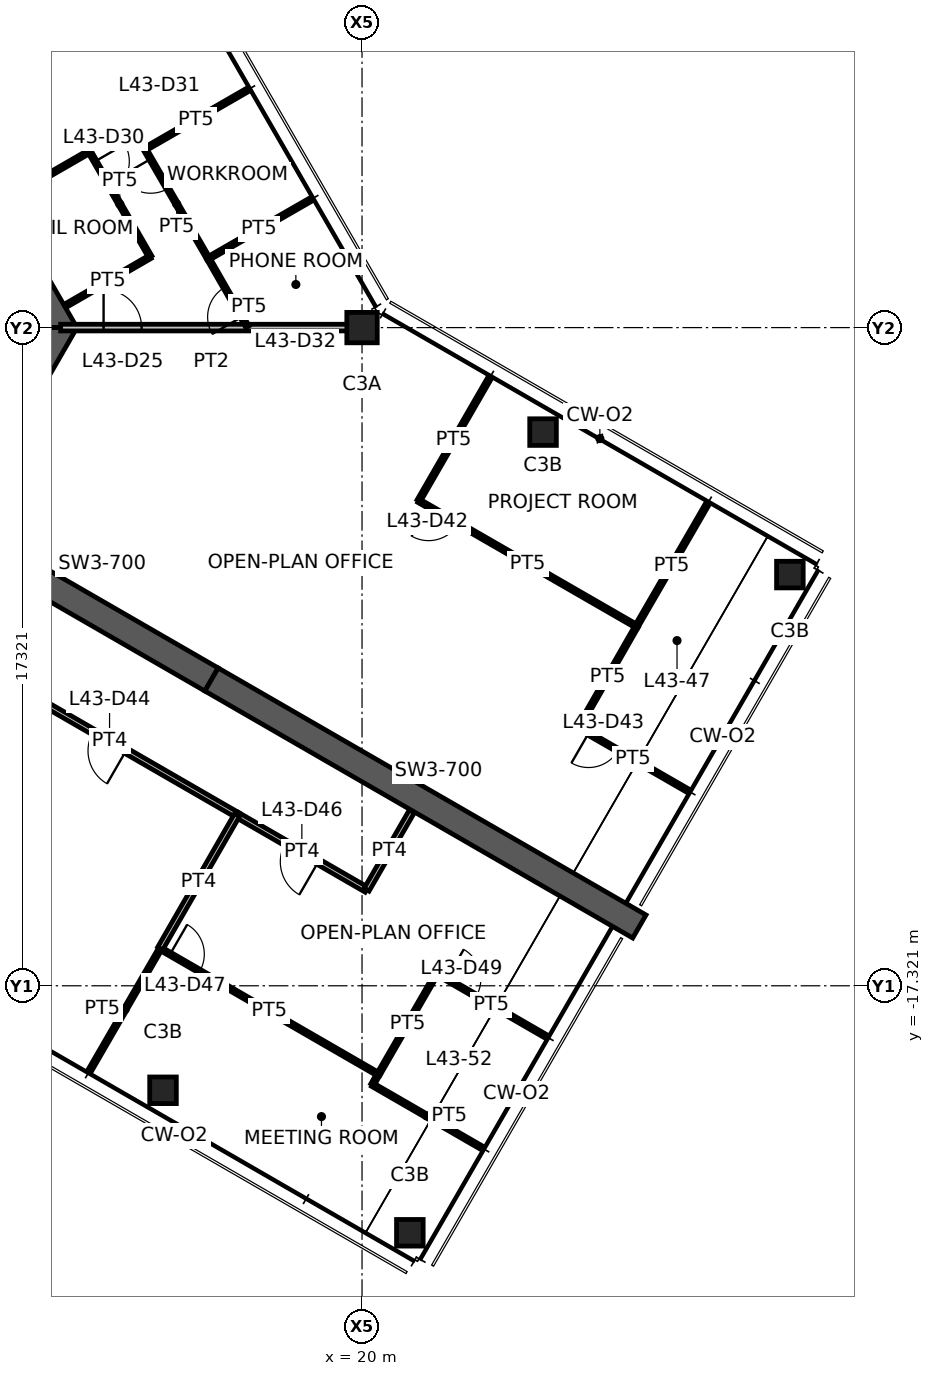
"""IFC4 building model, lengths in metres.
Left out: names, types, materials, properties, quantities, classifications, styles, units other than length and angle.
Written with IfcOpenShell. Run it as: python <this file> out.ifc"""

import sys

from ifc_helpers import new_model, si_unit, direction, frame, frame_2d, origin, origin_2d, place, context, subcontext, project, spatial, polyline, rectangle, hollow_rectangle, outline, extrude, element, fill, save


model = new_model("IFC4")
c1 = context("Model", 3, precision=1e-05, world=origin(), true_north=direction((0.0, 1.0)))
c2 = subcontext(c1, "Body", "Model", "MODEL_VIEW")
j1 = project(units=[si_unit("LENGTHUNIT", "METRE"), si_unit("PLANEANGLEUNIT", "RADIAN")], contexts=[c1])
p1 = place(None, origin())
s1 = spatial("IfcSite", under=j1, at=p1, CompositionType="ELEMENT")
p2 = place(p1, origin())
s2 = spatial("IfcBuilding", under=s1, at=p2, CompositionType="ELEMENT")
p3 = place(p2, frame((0.0, 0.0, 172.1)))
s3 = spatial("IfcBuildingStorey", under=s2, at=p3, CompositionType="ELEMENT", Elevation=172.1)
p4 = place(p3, frame((20.0, 0.0, 0.0), z_axis=(0.0, 0.0, 1.0), x_axis=(1.0, 0.0, 0.0)))
e1 = element("IfcColumn", 1, at=p4, inside=s3, PredefinedType="COLUMN", context=c2, shape_type="SweptSolid", body=[
    extrude(hollow_rectangle(XDim=0.8, YDim=0.8, WallThickness=0.045, at=origin_2d()), origin(), (0.0, 0.0, 1.0), 3.9),
])
for number, where, z_axis, x_axis in (
    (2, (14.763, -20.071, 0.0), (0.0, 0.0, 1.0), (1.0, 0.0, 0.0)),
    (3, (21.258, -23.821, 0.0), (0.0, 0.0, 1.0), (1.0, 0.0, 0.0)),
    (4, (24.763, -2.75, 0.0), (0.0, 0.0, 1.0), (1.0, 0.0, 0.0)),
    (5, (31.258, -6.5, 0.0), (0.0, 0.0, 1.0), (1.0, 0.0, 0.0)),
):
    element("IfcColumn", number, at=place(p3, frame(where, z_axis=z_axis, x_axis=x_axis)), inside=s3, PredefinedType="COLUMN", context=c2, shape_type="SweptSolid", body=[
        extrude(hollow_rectangle(XDim=0.7, YDim=0.7, WallThickness=0.036, at=origin_2d()), origin(), (0.0, 0.0, 1.0), 3.9),
    ])
p5 = place(p3, frame((11.922, 0.0, 0.0), z_axis=(0.0, 0.0, 1.0), x_axis=(-0.500004296715, 0.866022923061, 0.0)))
e6 = element("IfcWall", 6, at=p5, inside=s3, PredefinedType="SHEAR", context=c2, shape_type="SweptSolid", body=[
    extrude(outline(polyline([(-0.289, -0.5), (5.835, -0.5), (6.635, -0.5), (12.211, -0.5), (11.634, 0.5), (6.635, 0.5), (5.835, 0.5), (0.289, 0.5), (-0.289, -0.5)])), origin(), (0.0, 0.0, 1.0), 3.9),
])
p6 = place(p5, frame((5.835, 0.0, 0.0)))
e7 = element("IfcOpeningElement", 7, at=p6, cuts=e6, PredefinedType="OPENING", context=c2, shape_type="SweptSolid", body=[
    extrude(rectangle(XDim=0.8, YDim=2.1, at=frame_2d((0.4, 1.05))), frame((0.0, 0.51, 0.0), z_axis=(0.0, -1.0, 0.0), x_axis=(1.0, 0.0, 0.0)), (0.0, 0.0, 1.0), 1.02),
])
p7 = place(p3, frame((5.961, -10.325, 0.0), z_axis=(0.0, 0.0, 1.0), x_axis=(0.500004296715, 0.866022923061, 0.0)))
e8 = element("IfcWall", 8, at=p7, inside=s3, PredefinedType="SHEAR", context=c2, shape_type="SweptSolid", body=[
    extrude(outline(polyline([(-0.289, -0.5), (4.594, -0.5), (5.394, -0.5), (12.211, -0.5), (11.634, 0.5), (5.394, 0.5), (4.594, 0.5), (0.289, 0.5), (-0.289, -0.5)])), origin(), (0.0, 0.0, 1.0), 3.9),
])
p8 = place(p7, frame((4.594, 0.0, 0.0)))
e9 = element("IfcOpeningElement", 9, at=p8, cuts=e8, PredefinedType="OPENING", context=c2, shape_type="SweptSolid", body=[
    extrude(rectangle(XDim=0.8, YDim=2.1, at=frame_2d((0.4, 1.05))), frame((0.0, 0.51, 0.0), z_axis=(0.0, -1.0, 0.0), x_axis=(1.0, 0.0, 0.0)), (0.0, 0.0, 1.0), 1.02),
])
p9 = place(p3, frame((9.375, -5.413, 0.0), z_axis=(0.0, 0.0, 1.0), x_axis=(0.866032377459, -0.499987921047, 0.0)))
e10 = element("IfcWall", 10, at=p9, inside=s3, PredefinedType="SHEAR", context=c2, shape_type="SweptSolid", body=[
    extrude(rectangle(XDim=7.696, YDim=0.7, at=frame_2d((3.848, 0.0))), origin(), (0.0, 0.0, 1.0), 3.9),
])
p10 = place(p9, frame((0.9, 0.0, 0.0)))
e11 = element("IfcOpeningElement", 11, at=p10, cuts=e10, PredefinedType="OPENING", context=c2, shape_type="SweptSolid", body=[
    extrude(rectangle(XDim=1.0, YDim=2.1, at=frame_2d((0.5, 1.05))), frame((0.0, 0.36, 0.0), z_axis=(0.0, -1.0, 0.0), x_axis=(1.0, 0.0, 0.0)), (0.0, 0.0, 1.0), 0.72),
])
p11 = place(p3, frame((16.039, -9.26, 0.0), z_axis=(0.0, 0.0, 1.0), x_axis=(0.866024837091, -0.50000098154, 0.0)))
e12 = element("IfcWall", 12, at=p11, inside=s3, PredefinedType="SHEAR", context=c2, shape_type="SweptSolid", body=[
    extrude(rectangle(XDim=13.0, YDim=0.7, at=frame_2d((6.5, 0.0))), origin(), (0.0, 0.0, 1.0), 3.9),
])
p12 = place(p3, frame((12.07, 0.0, 0.0), z_axis=(0.0, 0.0, 1.0), x_axis=(1.0, 0.0, 0.0)))
e13 = element("IfcWall", 13, at=p12, inside=s3, PredefinedType="PARTITIONING", context=c2, shape_type="SweptSolid", body=[
    extrude(rectangle(XDim=7.93, YDim=0.175, at=frame_2d((3.965, 0.0))), origin(), (0.0, 0.0, 1.0), 3.05),
])
p13 = place(p12, frame((1.13, 0.0, 0.0)))
e14 = element("IfcOpeningElement", 14, at=p13, cuts=e13, PredefinedType="OPENING", context=c2, shape_type="SweptSolid", body=[
    extrude(rectangle(XDim=1.0, YDim=2.1, at=frame_2d((0.5, 1.05))), frame((0.0, 0.098, 0.0), z_axis=(0.0, -1.0, 0.0), x_axis=(1.0, 0.0, 0.0)), (0.0, 0.0, 1.0), 0.195),
])
p14 = place(p3, frame((10.592, 3.344, 0.0), z_axis=(0.0, 0.0, 1.0), x_axis=(0.866021702275, 0.500006411147, 0.0)))
e15 = element("IfcWall", 15, at=p14, inside=s3, PredefinedType="PARTITIONING", context=c2, shape_type="SweptSolid", body=[
    extrude(rectangle(XDim=2.58, YDim=0.1, at=frame_2d((1.29, 0.0))), origin(), (0.0, 0.0, 1.0), 2.95),
])
p15 = place(p3, frame((12.826, 4.634, 0.0), z_axis=(0.0, 0.0, 1.0), x_axis=(0.500028443584, -0.866008981251, 0.0)))
e16 = element("IfcWall", 16, at=p15, inside=s3, PredefinedType="PARTITIONING", context=c2, shape_type="SweptSolid", body=[
    extrude(rectangle(XDim=3.2, YDim=0.1, at=frame_2d((1.6, 0.0))), origin(), (0.0, 0.0, 1.0), 2.95),
])
p16 = place(p15, frame((0.3, 0.0, 0.0)))
e17 = element("IfcOpeningElement", 17, at=p16, cuts=e16, PredefinedType="OPENING", context=c2, shape_type="SweptSolid", body=[
    extrude(rectangle(XDim=0.9, YDim=2.1, at=frame_2d((0.45, 1.05))), frame((0.0, 0.06, 0.0), z_axis=(0.0, -1.0, 0.0), x_axis=(1.0, 0.0, 0.0)), (0.0, 0.0, 1.0), 0.12),
])
p17 = place(p3, frame((14.427, 1.863, 0.0), z_axis=(0.0, 0.0, 1.0), x_axis=(-0.866045356598, -0.49996543912, 0.0)))
e18 = element("IfcWall", 18, at=p17, inside=s3, PredefinedType="PARTITIONING", context=c2, shape_type="SweptSolid", body=[
    extrude(rectangle(XDim=2.58, YDim=0.1, at=frame_2d((1.29, 0.0))), origin(), (0.0, 0.0, 1.0), 2.95),
])
p18 = place(p3, frame((18.62, 3.351, 0.0), z_axis=(0.0, 0.0, 1.0), x_axis=(-0.866810383216, -0.498637904244, 0.0)))
e19 = element("IfcWall", 19, at=p18, inside=s3, PredefinedType="PARTITIONING", context=c2, shape_type="SweptSolid", body=[
    extrude(rectangle(XDim=3.08, YDim=0.1, at=frame_2d((1.54, 0.0))), origin(), (0.0, 0.0, 1.0), 2.95),
])
p19 = place(p3, frame((14.287, 4.695, 0.0), z_axis=(0.0, 0.0, 1.0), x_axis=(0.866023220135, 0.500003782172, 0.0)))
e20 = element("IfcWall", 20, at=p19, inside=s3, PredefinedType="PARTITIONING", context=c2, shape_type="SweptSolid", body=[
    extrude(rectangle(XDim=3.105, YDim=0.1, at=frame_2d((1.552, 0.0))), origin(), (0.0, 0.0, 1.0), 2.95),
])
p20 = place(p3, frame((15.956, 1.813, 0.0), z_axis=(0.0, 0.0, 1.0), x_axis=(-0.501111387448, 0.865382792393, 0.0)))
e21 = element("IfcWall", 21, at=p20, inside=s3, PredefinedType="PARTITIONING", context=c2, shape_type="SweptSolid", body=[
    extrude(rectangle(XDim=3.331, YDim=0.1, at=frame_2d((1.666, 0.0))), origin(), (0.0, 0.0, 1.0), 2.95),
])
p21 = place(p20, frame((2.131, 0.0, 0.0)))
e22 = element("IfcOpeningElement", 22, at=p21, cuts=e21, PredefinedType="OPENING", context=c2, shape_type="SweptSolid", body=[
    extrude(rectangle(XDim=0.9, YDim=2.1, at=frame_2d((0.45, 1.05))), frame((0.0, 0.06, 0.0), z_axis=(0.0, -1.0, 0.0), x_axis=(1.0, 0.0, 0.0)), (0.0, 0.0, 1.0), 0.12),
])
p22 = place(p3, frame((16.986, 0.02, 0.0), z_axis=(0.0, 0.0, 1.0), x_axis=(-0.498096123952, 0.867121820337, 0.0)))
e23 = element("IfcWall", 23, at=p22, inside=s3, PredefinedType="PARTITIONING", context=c2, shape_type="SweptSolid", body=[
    extrude(rectangle(XDim=2.067, YDim=0.1, at=frame_2d((1.034, 0.0))), origin(), (0.0, 0.0, 1.0), 2.95),
])
p23 = place(p22, frame((0.3, 0.0, 0.0)))
e24 = element("IfcOpeningElement", 24, at=p23, cuts=e23, PredefinedType="OPENING", context=c2, shape_type="SweptSolid", body=[
    extrude(rectangle(XDim=0.9, YDim=2.1, at=frame_2d((0.45, 1.05))), frame((0.0, 0.06, 0.0), z_axis=(0.0, -1.0, 0.0), x_axis=(1.0, 0.0, 0.0)), (0.0, 0.0, 1.0), 0.12),
])
p24 = place(p3, frame((29.077, -4.658, 0.0), z_axis=(0.0, 0.0, 1.0), x_axis=(-0.501275229052, -0.865287897026, 0.0)))
e25 = element("IfcWall", 25, at=p24, inside=s3, PredefinedType="PARTITIONING", context=c2, shape_type="SweptSolid", body=[
    extrude(rectangle(XDim=3.705, YDim=0.1, at=frame_2d((1.853, 0.0))), origin(), (0.0, 0.0, 1.0), 2.95),
])
p25 = place(p3, frame((21.492, -4.557, 0.0), z_axis=(0.0, 0.0, 1.0), x_axis=(0.500013413428, 0.866017659399, 0.0)))
e26 = element("IfcWall", 26, at=p25, inside=s3, PredefinedType="PARTITIONING", context=c2, shape_type="SweptSolid", body=[
    extrude(rectangle(XDim=3.68, YDim=0.1, at=frame_2d((1.84, 0.0))), origin(), (0.0, 0.0, 1.0), 2.95),
])
p26 = place(p3, frame((27.227, -7.863, 0.0), z_axis=(0.0, 0.0, 1.0), x_axis=(-0.866343956507, 0.499447844147, 0.0)))
e27 = element("IfcWall", 27, at=p26, inside=s3, PredefinedType="PARTITIONING", context=c2, shape_type="SweptSolid", body=[
    extrude(rectangle(XDim=6.62, YDim=0.1, at=frame_2d((3.31, 0.0))), origin(), (0.0, 0.0, 1.0), 2.95),
])
p27 = place(p26, frame((5.42, 0.0, 0.0)))
e28 = element("IfcOpeningElement", 28, at=p27, cuts=e27, PredefinedType="OPENING", context=c2, shape_type="SweptSolid", body=[
    extrude(rectangle(XDim=0.9, YDim=2.1, at=frame_2d((0.45, 1.05))), frame((0.0, 0.06, 0.0), z_axis=(0.0, -1.0, 0.0), x_axis=(1.0, 0.0, 0.0)), (0.0, 0.0, 1.0), 0.12),
])
p28 = place(p3, frame((25.7, -10.527, 0.0), z_axis=(0.0, 0.0, 1.0), x_axis=(0.497097650811, 0.867694603855, 0.0)))
e29 = element("IfcWall", 29, at=p28, inside=s3, PredefinedType="PARTITIONING", context=c2, shape_type="SweptSolid", body=[
    extrude(rectangle(XDim=3.071, YDim=0.1, at=frame_2d((1.535, 0.0))), origin(), (0.0, 0.0, 1.0), 2.95),
])
p29 = place(p3, frame((28.562, -12.18, 0.0), z_axis=(0.0, 0.0, 1.0), x_axis=(-0.866020751647, 0.500008057651, 0.0)))
e30 = element("IfcWall", 30, at=p29, inside=s3, PredefinedType="PARTITIONING", context=c2, shape_type="SweptSolid", body=[
    extrude(rectangle(XDim=3.305, YDim=0.1, at=frame_2d((1.653, 0.0))), origin(), (0.0, 0.0, 1.0), 2.95),
])
p30 = place(p29, frame((2.105, 0.0, 0.0)))
e31 = element("IfcOpeningElement", 31, at=p30, cuts=e30, PredefinedType="OPENING", context=c2, shape_type="SweptSolid", body=[
    extrude(rectangle(XDim=0.9, YDim=2.1, at=frame_2d((0.45, 1.05))), frame((0.0, 0.06, 0.0), z_axis=(0.0, -1.0, 0.0), x_axis=(1.0, 0.0, 0.0)), (0.0, 0.0, 1.0), 0.12),
])
p31 = place(p3, frame((16.721, -12.83, 0.0), z_axis=(0.0, 0.0, 1.0), x_axis=(-0.866020780657, 0.500008007406, 0.0)))
e32 = element("IfcWall", 32, at=p31, inside=s3, PredefinedType="PARTITIONING", context=c2, shape_type="SweptSolid", body=[
    extrude(rectangle(XDim=7.771, YDim=0.15, at=frame_2d((3.885, 0.0))), origin(), (0.0, 0.0, 1.0), 2.95),
])
p32 = place(p31, frame((3.385, 0.0, 0.0)))
e33 = element("IfcOpeningElement", 33, at=p32, cuts=e32, PredefinedType="OPENING", context=c2, shape_type="SweptSolid", body=[
    extrude(rectangle(XDim=1.0, YDim=2.1, at=frame_2d((0.5, 1.05))), frame((0.0, 0.085, 0.0), z_axis=(0.0, -1.0, 0.0), x_axis=(1.0, 0.0, 0.0)), (0.0, 0.0, 1.0), 0.17),
])
p33 = place(p3, frame((20.12, -14.792, 0.0), z_axis=(0.0, 0.0, 1.0), x_axis=(-0.866038848349, 0.499976712608, 0.0)))
e34 = element("IfcWall", 34, at=p33, inside=s3, PredefinedType="PARTITIONING", context=c2, shape_type="SweptSolid", body=[
    extrude(rectangle(XDim=3.934, YDim=0.15, at=frame_2d((1.967, 0.0))), origin(), (0.0, 0.0, 1.0), 2.95),
])
p34 = place(p33, frame((1.467, 0.0, 0.0)))
e35 = element("IfcOpeningElement", 35, at=p34, cuts=e34, PredefinedType="OPENING", context=c2, shape_type="SweptSolid", body=[
    extrude(rectangle(XDim=1.0, YDim=2.1, at=frame_2d((0.5, 1.05))), frame((0.0, 0.085, 0.0), z_axis=(0.0, -1.0, 0.0), x_axis=(1.0, 0.0, 0.0)), (0.0, 0.0, 1.0), 0.17),
])
p35 = place(p3, frame((21.31, -12.731, 0.0), z_axis=(0.0, 0.0, 1.0), x_axis=(-0.500077627542, -0.865980580863, 0.0)))
e36 = element("IfcWall", 36, at=p35, inside=s3, PredefinedType="PARTITIONING", context=c2, shape_type="SweptSolid", body=[
    extrude(rectangle(XDim=2.38, YDim=0.15, at=frame_2d((1.19, 0.0))), origin(), (0.0, 0.0, 1.0), 2.95),
])
p36 = place(p3, frame((20.275, -19.924, 0.0), z_axis=(0.0, 0.0, 1.0), x_axis=(0.86598972202, -0.500061797536, 0.0)))
e37 = element("IfcWall", 37, at=p36, inside=s3, PredefinedType="PARTITIONING", context=c2, shape_type="SweptSolid", body=[
    extrude(rectangle(XDim=3.28, YDim=0.1, at=frame_2d((1.64, 0.0))), origin(), (0.0, 0.0, 1.0), 2.95),
])
p37 = place(p3, frame((20.43, -19.646, 0.0), z_axis=(0.0, 0.0, 1.0), x_axis=(-0.486425680342, -0.873721956634, 0.0)))
e38 = element("IfcWall", 38, at=p37, inside=s3, PredefinedType="PARTITIONING", context=c2, shape_type="SweptSolid", body=[
    extrude(rectangle(XDim=0.318, YDim=0.1, at=frame_2d((0.159, 0.0))), origin(), (0.0, 0.0, 1.0), 2.95),
])
p38 = place(p3, frame((12.84, -19.543, 0.0), z_axis=(0.0, 0.0, 1.0), x_axis=(0.50111938689, 0.865378160161, 0.0)))
e39 = element("IfcWall", 39, at=p38, inside=s3, PredefinedType="PARTITIONING", context=c2, shape_type="SweptSolid", body=[
    extrude(rectangle(XDim=3.705, YDim=0.1, at=frame_2d((1.853, 0.0))), origin(), (0.0, 0.0, 1.0), 2.95),
])
p39 = place(p3, frame((14.69, -16.338, 0.0), z_axis=(0.0, 0.0, 1.0), x_axis=(0.866056800938, -0.499945614591, 0.0)))
e40 = element("IfcWall", 40, at=p39, inside=s3, PredefinedType="PARTITIONING", context=c2, shape_type="SweptSolid", body=[
    extrude(rectangle(XDim=6.629, YDim=0.1, at=frame_2d((3.314, 0.0))), origin(), (0.0, 0.0, 1.0), 2.95),
])
p40 = place(p39, frame((0.3, 0.0, 0.0)))
e41 = element("IfcOpeningElement", 41, at=p40, cuts=e40, PredefinedType="OPENING", context=c2, shape_type="SweptSolid", body=[
    extrude(rectangle(XDim=0.9, YDim=2.1, at=frame_2d((0.45, 1.05))), frame((0.0, 0.06, 0.0), z_axis=(0.0, -1.0, 0.0), x_axis=(1.0, 0.0, 0.0)), (0.0, 0.0, 1.0), 0.12),
])
p41 = place(p3, frame((20.431, -19.653, 0.0), z_axis=(0.0, 0.0, 1.0), x_axis=(0.500029867204, 0.86600815926, 0.0)))
e42 = element("IfcWall", 42, at=p41, inside=s3, PredefinedType="PARTITIONING", context=c2, shape_type="SweptSolid", body=[
    extrude(rectangle(XDim=3.071, YDim=0.1, at=frame_2d((1.535, 0.0))), origin(), (0.0, 0.0, 1.0), 2.95),
])
p42 = place(p3, frame((21.967, -16.993, 0.0), z_axis=(0.0, 0.0, 1.0), x_axis=(0.866020751647, -0.500008057651, 0.0)))
e43 = element("IfcWall", 43, at=p42, inside=s3, PredefinedType="PARTITIONING", context=c2, shape_type="SweptSolid", body=[
    extrude(rectangle(XDim=3.305, YDim=0.1, at=frame_2d((1.653, 0.0))), origin(), (0.0, 0.0, 1.0), 2.95),
])
p43 = place(p42, frame((0.3, 0.0, 0.0)))
e44 = element("IfcOpeningElement", 44, at=p43, cuts=e43, PredefinedType="OPENING", context=c2, shape_type="SweptSolid", body=[
    extrude(rectangle(XDim=0.9, YDim=2.1, at=frame_2d((0.45, 1.05))), frame((0.0, 0.06, 0.0), z_axis=(0.0, -1.0, 0.0), x_axis=(1.0, 0.0, 0.0)), (0.0, 0.0, 1.0), 0.12),
])
p44 = place(p3, frame((16.713, -12.825, 0.0), z_axis=(0.0, 0.0, 1.0), x_axis=(-0.498976779382, -0.866615355067, 0.0)))
e45 = element("IfcWall", 45, at=p44, inside=s3, PredefinedType="PARTITIONING", context=c2, shape_type="SweptSolid", body=[
    extrude(rectangle(XDim=4.054, YDim=0.15, at=frame_2d((2.027, 0.0))), origin(), (0.0, 0.0, 1.0), 2.95),
])
p45 = place(p13, origin())
e46 = element("IfcDoor", 46, at=p45, inside=s3, OperationType="SINGLE_SWING_LEFT", PredefinedType="DOOR", context=c2, shape_type="SweptSolid", body=[
    extrude(rectangle(XDim=1.0, YDim=2.1, at=frame_2d((0.5, 1.05))), frame((0.0, 0.025, 0.0), z_axis=(0.0, -1.0, 0.0), x_axis=(1.0, 0.0, 0.0)), (0.0, 0.0, 1.0), 0.05),
])
fill(e14, e46)
p46 = place(p16, origin())
e47 = element("IfcDoor", 47, at=p46, inside=s3, OperationType="SINGLE_SWING_LEFT", PredefinedType="DOOR", context=c2, shape_type="SweptSolid", body=[
    extrude(rectangle(XDim=0.9, YDim=2.1, at=frame_2d((0.45, 1.05))), frame((0.0, 0.025, 0.0), z_axis=(0.0, -1.0, 0.0), x_axis=(1.0, 0.0, 0.0)), (0.0, 0.0, 1.0), 0.05),
])
fill(e17, e47)
p47 = place(p21, origin())
e48 = element("IfcDoor", 48, at=p47, inside=s3, OperationType="SINGLE_SWING_RIGHT", PredefinedType="DOOR", context=c2, shape_type="SweptSolid", body=[
    extrude(rectangle(XDim=0.9, YDim=2.1, at=frame_2d((0.45, 1.05))), frame((0.0, 0.025, 0.0), z_axis=(0.0, -1.0, 0.0), x_axis=(1.0, 0.0, 0.0)), (0.0, 0.0, 1.0), 0.05),
])
fill(e22, e48)
p48 = place(p23, origin())
e49 = element("IfcDoor", 49, at=p48, inside=s3, OperationType="SINGLE_SWING_LEFT", PredefinedType="DOOR", context=c2, shape_type="SweptSolid", body=[
    extrude(rectangle(XDim=0.9, YDim=2.1, at=frame_2d((0.45, 1.05))), frame((0.0, 0.025, 0.0), z_axis=(0.0, -1.0, 0.0), x_axis=(1.0, 0.0, 0.0)), (0.0, 0.0, 1.0), 0.05),
])
fill(e24, e49)
p49 = place(p27, origin())
e50 = element("IfcDoor", 50, at=p49, inside=s3, OperationType="SINGLE_SWING_RIGHT", PredefinedType="DOOR", context=c2, shape_type="SweptSolid", body=[
    extrude(rectangle(XDim=0.9, YDim=2.1, at=frame_2d((0.45, 1.05))), frame((0.0, 0.025, 0.0), z_axis=(0.0, -1.0, 0.0), x_axis=(1.0, 0.0, 0.0)), (0.0, 0.0, 1.0), 0.05),
])
fill(e28, e50)
p50 = place(p30, origin())
e51 = element("IfcDoor", 51, at=p50, inside=s3, OperationType="SINGLE_SWING_RIGHT", PredefinedType="DOOR", context=c2, shape_type="SweptSolid", body=[
    extrude(rectangle(XDim=0.9, YDim=2.1, at=frame_2d((0.45, 1.05))), frame((0.0, 0.025, 0.0), z_axis=(0.0, -1.0, 0.0), x_axis=(1.0, 0.0, 0.0)), (0.0, 0.0, 1.0), 0.05),
])
fill(e31, e51)
p51 = place(p32, origin())
e52 = element("IfcDoor", 52, at=p51, inside=s3, OperationType="SINGLE_SWING_LEFT", PredefinedType="DOOR", context=c2, shape_type="SweptSolid", body=[
    extrude(rectangle(XDim=1.0, YDim=2.1, at=frame_2d((0.5, 1.05))), frame((0.0, 0.025, 0.0), z_axis=(0.0, -1.0, 0.0), x_axis=(1.0, 0.0, 0.0)), (0.0, 0.0, 1.0), 0.05),
])
fill(e33, e52)
p52 = place(p34, origin())
e53 = element("IfcDoor", 53, at=p52, inside=s3, OperationType="SINGLE_SWING_LEFT", PredefinedType="DOOR", context=c2, shape_type="SweptSolid", body=[
    extrude(rectangle(XDim=1.0, YDim=2.1, at=frame_2d((0.5, 1.05))), frame((0.0, 0.025, 0.0), z_axis=(0.0, -1.0, 0.0), x_axis=(1.0, 0.0, 0.0)), (0.0, 0.0, 1.0), 0.05),
])
fill(e35, e53)
p53 = place(p40, origin())
e54 = element("IfcDoor", 54, at=p53, inside=s3, OperationType="SINGLE_SWING_LEFT", PredefinedType="DOOR", context=c2, shape_type="SweptSolid", body=[
    extrude(rectangle(XDim=0.9, YDim=2.1, at=frame_2d((0.45, 1.05))), frame((0.0, 0.025, 0.0), z_axis=(0.0, -1.0, 0.0), x_axis=(1.0, 0.0, 0.0)), (0.0, 0.0, 1.0), 0.05),
])
fill(e41, e54)
p54 = place(p43, origin())
e55 = element("IfcDoor", 55, at=p54, inside=s3, OperationType="SINGLE_SWING_LEFT", PredefinedType="DOOR", context=c2, shape_type="SweptSolid", body=[
    extrude(rectangle(XDim=0.9, YDim=2.1, at=frame_2d((0.45, 1.05))), frame((0.0, 0.025, 0.0), z_axis=(0.0, -1.0, 0.0), x_axis=(1.0, 0.0, 0.0)), (0.0, 0.0, 1.0), 0.05),
])
fill(e44, e55)
save(model, sys.argv[1])
